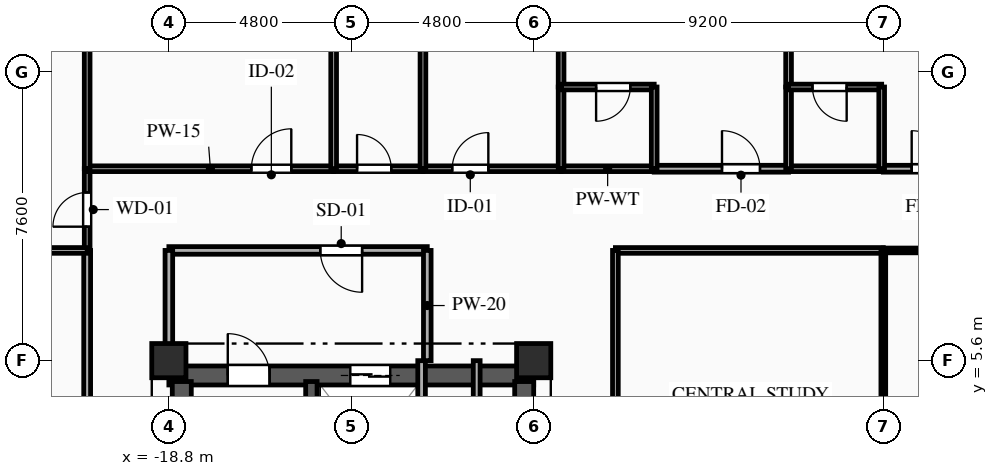
"""IFC4 building model, lengths in metres.
Left out: names, types, materials, properties, quantities, classifications, styles, units other than length and angle.
Written with IfcOpenShell. Run it as: python <this file> out.ifc"""

import sys

from ifc_helpers import new_model, si_unit, direction, frame, frame_2d, origin, origin_2d, place, context, subcontext, project, spatial, rectangle, extrude, element, fill, save


model = new_model("IFC4")
c1 = context("Model", 3, precision=1e-05, world=origin(), true_north=direction((0.0, 1.0)))
c2 = subcontext(c1, "Body", "Model", "MODEL_VIEW")
j1 = project(units=[si_unit("LENGTHUNIT", "METRE"), si_unit("PLANEANGLEUNIT", "RADIAN")], contexts=[c1])
p1 = place(None, origin())
s1 = spatial("IfcSite", under=j1, at=p1, CompositionType="ELEMENT")
p2 = place(p1, origin())
s2 = spatial("IfcBuilding", under=s1, at=p2, CompositionType="ELEMENT")
p3 = place(p2, frame((0.0, 0.0, 134.35)))
s3 = spatial("IfcBuildingStorey", under=s2, at=p3, CompositionType="ELEMENT", Elevation=134.35)
for number, where, z_axis, x_axis in (
    (1, (-18.8, 5.6, 0.0), (0.0, 0.0, 1.0), (1.0, 0.0, 0.0)),
    (2, (-9.2, 5.6, 0.0), (0.0, 0.0, 1.0), (1.0, 0.0, 0.0)),
):
    element("IfcColumn", number, at=place(p3, frame(where, z_axis=z_axis, x_axis=x_axis)), inside=s3, PredefinedType="COLUMN", context=c2, shape_type="SweptSolid", body=[
        extrude(rectangle(XDim=0.9, YDim=0.9, at=origin_2d()), origin(), (0.0, 0.0, 1.0), 3.35),
    ])
p4 = place(p3, frame((-18.8, 5.21, 0.0), z_axis=(0.0, 0.0, 1.0), x_axis=(1.0, 0.0, 0.0)))
e3 = element("IfcWall", 3, at=p4, inside=s3, PredefinedType="SHEAR", context=c2, shape_type="SweptSolid", body=[
    extrude(rectangle(XDim=9.6, YDim=0.5, at=frame_2d((4.8, 0.0))), origin(), (0.0, 0.0, 1.0), 3.04),
])
p5 = place(p4, frame((1.55, 0.0, 0.0)))
e4 = element("IfcOpeningElement", 4, at=p5, cuts=e3, PredefinedType="OPENING", context=c2, shape_type="SweptSolid", body=[
    extrude(rectangle(XDim=1.1, YDim=2.15, at=frame_2d((0.55, 1.075))), frame((0.0, 0.26, 0.0), z_axis=(0.0, -1.0, 0.0), x_axis=(1.0, 0.0, 0.0)), (0.0, 0.0, 1.0), 0.52),
])
p6 = place(p4, frame((4.775, 0.0, 0.0)))
e5 = element("IfcOpeningElement", 5, at=p6, cuts=e3, PredefinedType="OPENING", context=c2, shape_type="SweptSolid", body=[
    extrude(rectangle(XDim=1.05, YDim=2.1, at=frame_2d((0.525, 1.05))), frame((0.0, 0.26, 0.0), z_axis=(0.0, -1.0, 0.0), x_axis=(1.0, 0.0, 0.0)), (0.0, 0.0, 1.0), 0.52),
])
p7 = place(p3, frame((-18.46, -5.05, 0.0), z_axis=(0.0, 0.0, 1.0), x_axis=(0.0, 1.0, 0.0)))
e6 = element("IfcWall", 6, at=p7, inside=s3, PredefinedType="SHEAR", context=c2, shape_type="SweptSolid", body=[
    extrude(rectangle(XDim=10.1, YDim=0.5, at=frame_2d((5.05, 0.0))), origin(), (0.0, 0.0, 1.0), 3.04),
])
p8 = place(p3, frame((-9.45, -5.05, 0.0), z_axis=(0.0, 0.0, 1.0), x_axis=(0.0, 1.0, 0.0)))
e7 = element("IfcWall", 7, at=p8, inside=s3, PredefinedType="SHEAR", context=c2, shape_type="SweptSolid", body=[
    extrude(rectangle(XDim=10.1, YDim=0.5, at=frame_2d((5.05, 0.0))), origin(), (0.0, 0.0, 1.0), 3.04),
])
p9 = place(p8, frame((7.15, 0.0, 0.0)))
e8 = element("IfcOpeningElement", 8, at=p9, cuts=e7, PredefinedType="OPENING", context=c2, shape_type="SweptSolid", body=[
    extrude(rectangle(XDim=0.9, YDim=2.1, at=frame_2d((0.45, 1.05))), frame((0.0, 0.26, 0.0), z_axis=(0.0, -1.0, 0.0), x_axis=(1.0, 0.0, 0.0)), (0.0, 0.0, 1.0), 0.52),
])
p10 = place(p8, frame((2.4, 0.0, 0.0)))
e9 = element("IfcOpeningElement", 9, at=p10, cuts=e7, PredefinedType="OPENING", context=c2, shape_type="SweptSolid", body=[
    extrude(rectangle(XDim=1.2, YDim=2.15, at=frame_2d((0.6, 1.075))), frame((0.0, 0.26, 0.0), z_axis=(0.0, -1.0, 0.0), x_axis=(1.0, 0.0, 0.0)), (0.0, 0.0, 1.0), 0.52),
])
p11 = place(p8, frame((0.35, 0.0, 0.0)))
e10 = element("IfcOpeningElement", 10, at=p11, cuts=e7, PredefinedType="OPENING", context=c2, shape_type="SweptSolid", body=[
    extrude(rectangle(XDim=0.9, YDim=2.1, at=frame_2d((0.45, 1.05))), frame((0.0, 0.26, 0.0), z_axis=(0.0, -1.0, 0.0), x_axis=(1.0, 0.0, 0.0)), (0.0, 0.0, 1.0), 0.52),
])
p12 = place(p8, frame((5.0, 0.0, 0.0)))
e11 = element("IfcOpeningElement", 11, at=p12, cuts=e7, PredefinedType="OPENING", context=c2, shape_type="SweptSolid", body=[
    extrude(rectangle(XDim=0.9, YDim=2.1, at=frame_2d((0.45, 1.05))), frame((0.0, 0.26, 0.0), z_axis=(0.0, -1.0, 0.0), x_axis=(1.0, 0.0, 0.0)), (0.0, 0.0, 1.0), 0.52),
])
p13 = place(p3, frame((-15.05, -5.05, 0.0), z_axis=(0.0, 0.0, 1.0), x_axis=(0.0, 1.0, 0.0)))
e12 = element("IfcWall", 12, at=p13, inside=s3, PredefinedType="SHEAR", context=c2, shape_type="SweptSolid", body=[
    extrude(rectangle(XDim=10.1, YDim=0.3, at=frame_2d((5.05, 0.0))), origin(), (0.0, 0.0, 1.0), 3.04),
])
p14 = place(p3, frame((-12.15, 1.55, 0.0), z_axis=(0.0, 0.0, 1.0), x_axis=(0.0, 1.0, 0.0)))
e13 = element("IfcWall", 13, at=p14, inside=s3, PredefinedType="PARTITIONING", context=c2, shape_type="SweptSolid", body=[
    extrude(rectangle(XDim=4.05, YDim=0.2, at=frame_2d((2.025, 0.0))), origin(), (0.0, 0.0, 1.0), 3.04),
])
p15 = place(p3, frame((-12.0, 8.5, 0.0), z_axis=(0.0, 0.0, 1.0), x_axis=(-1.0, 0.0, 0.0)))
e14 = element("IfcWall", 14, at=p15, inside=s3, PredefinedType="PARTITIONING", context=c2, shape_type="SweptSolid", body=[
    extrude(rectangle(XDim=6.8, YDim=0.2, at=frame_2d((3.4, 0.0))), origin(), (0.0, 0.0, 1.0), 3.04),
])
p16 = place(p15, frame((1.715, 0.0, 0.0)))
e15 = element("IfcOpeningElement", 15, at=p16, cuts=e14, PredefinedType="OPENING", context=c2, shape_type="SweptSolid", body=[
    extrude(rectangle(XDim=1.1, YDim=2.15, at=frame_2d((0.55, 1.075))), frame((0.0, 0.11, 0.0), z_axis=(0.0, -1.0, 0.0), x_axis=(1.0, 0.0, 0.0)), (0.0, 0.0, 1.0), 0.22),
])
p17 = place(p3, frame((-18.8, 8.5, 0.0), z_axis=(0.0, 0.0, 1.0), x_axis=(0.0, -1.0, 0.0)))
e16 = element("IfcWall", 16, at=p17, inside=s3, PredefinedType="PARTITIONING", context=c2, shape_type="SweptSolid", body=[
    extrude(rectangle(XDim=2.9, YDim=0.2, at=frame_2d((1.45, 0.0))), origin(), (0.0, 0.0, 1.0), 2.525),
])
p18 = place(p3, frame((-12.0, 5.6, 0.0), z_axis=(0.0, 0.0, 1.0), x_axis=(0.0, 1.0, 0.0)))
e17 = element("IfcWall", 17, at=p18, inside=s3, PredefinedType="PARTITIONING", context=c2, shape_type="SweptSolid", body=[
    extrude(rectangle(XDim=2.9, YDim=0.2, at=frame_2d((1.45, 0.0))), origin(), (0.0, 0.0, 1.0), 3.04),
])
p19 = place(p3, frame((-10.7, 5.6, 0.0), z_axis=(0.0, 0.0, 1.0), x_axis=(0.0, -1.0, 0.0)))
e18 = element("IfcWall", 18, at=p19, inside=s3, PredefinedType="PARTITIONING", context=c2, shape_type="SweptSolid", body=[
    extrude(rectangle(XDim=4.05, YDim=0.18, at=frame_2d((2.025, 0.0))), origin(), (0.0, 0.0, 1.0), 3.04),
])
p20 = place(p19, frame((1.325, 0.0, 0.0)))
e19 = element("IfcOpeningElement", 19, at=p20, cuts=e18, PredefinedType="OPENING", context=c2, shape_type="SweptSolid", body=[
    extrude(rectangle(XDim=1.25, YDim=2.2, at=frame_2d((0.625, 1.1))), frame((0.0, 0.1, 0.0), z_axis=(0.0, -1.0, 0.0), x_axis=(1.0, 0.0, 0.0)), (0.0, 0.0, 1.0), 0.2),
])
p21 = place(p3, frame((-20.95, 8.5, 0.0), z_axis=(0.0, 0.0, 1.0), x_axis=(0.0, 1.0, 0.0)))
e20 = element("IfcWall", 20, at=p21, inside=s3, PredefinedType="PARTITIONING", context=c2, shape_type="SweptSolid", body=[
    extrude(rectangle(XDim=2.15, YDim=0.15, at=frame_2d((1.075, 0.0))), origin(), (0.0, 0.0, 1.0), 3.04),
])
p22 = place(p21, frame((0.625, 0.0, 0.0)))
e21 = element("IfcOpeningElement", 21, at=p22, cuts=e20, PredefinedType="OPENING", context=c2, shape_type="SweptSolid", body=[
    extrude(rectangle(XDim=0.9, YDim=2.1, at=frame_2d((0.45, 1.05))), frame((0.0, 0.085, 0.0), z_axis=(0.0, -1.0, 0.0), x_axis=(1.0, 0.0, 0.0)), (0.0, 0.0, 1.0), 0.17),
])
p23 = place(p3, frame((-20.95, 10.65, 0.0), z_axis=(0.0, 0.0, 1.0), x_axis=(1.0, 0.0, 0.0)))
e22 = element("IfcWall", 22, at=p23, inside=s3, PredefinedType="PARTITIONING", context=c2, shape_type="SweptSolid", body=[
    extrude(rectangle(XDim=6.486, YDim=0.15, at=frame_2d((3.243, 0.0))), origin(), (0.0, 0.0, 1.0), 3.04),
])
p24 = place(p23, frame((4.322, 0.0, 0.0)))
e23 = element("IfcOpeningElement", 23, at=p24, cuts=e22, PredefinedType="OPENING", context=c2, shape_type="SweptSolid", body=[
    extrude(rectangle(XDim=1.05, YDim=2.15, at=frame_2d((0.525, 1.075))), frame((0.0, 0.085, 0.0), z_axis=(0.0, -1.0, 0.0), x_axis=(1.0, 0.0, 0.0)), (0.0, 0.0, 1.0), 0.17),
])
p25 = place(p3, frame((-14.464, 10.65, 0.0), z_axis=(0.0, 0.0, 1.0), x_axis=(1.0, 0.0, 0.0)))
e24 = element("IfcWall", 24, at=p25, inside=s3, PredefinedType="PLUMBINGWALL", context=c2, shape_type="SweptSolid", body=[
    extrude(rectangle(XDim=2.35, YDim=0.15, at=frame_2d((1.175, 0.0))), origin(), (0.0, 0.0, 1.0), 3.04),
])
p26 = place(p25, frame((0.616, 0.0, 0.0)))
e25 = element("IfcOpeningElement", 25, at=p26, cuts=e24, PredefinedType="OPENING", context=c2, shape_type="SweptSolid", body=[
    extrude(rectangle(XDim=0.9, YDim=2.1, at=frame_2d((0.45, 1.05))), frame((0.0, 0.085, 0.0), z_axis=(0.0, -1.0, 0.0), x_axis=(1.0, 0.0, 0.0)), (0.0, 0.0, 1.0), 0.17),
])
p27 = place(p3, frame((-12.114, 10.65, 0.0), z_axis=(0.0, 0.0, 1.0), x_axis=(1.0, 0.0, 0.0)))
e26 = element("IfcWall", 26, at=p27, inside=s3, PredefinedType="PARTITIONING", context=c2, shape_type="SweptSolid", body=[
    extrude(rectangle(XDim=3.635, YDim=0.15, at=frame_2d((1.817, 0.0))), origin(), (0.0, 0.0, 1.0), 3.04),
])
p28 = place(p27, frame((0.771, 0.0, 0.0)))
e27 = element("IfcOpeningElement", 27, at=p28, cuts=e26, PredefinedType="OPENING", context=c2, shape_type="SweptSolid", body=[
    extrude(rectangle(XDim=0.95, YDim=2.1, at=frame_2d((0.475, 1.05))), frame((0.0, 0.085, 0.0), z_axis=(0.0, -1.0, 0.0), x_axis=(1.0, 0.0, 0.0)), (0.0, 0.0, 1.0), 0.17),
])
p29 = place(p3, frame((-6.029, 10.65, 0.0), z_axis=(0.0, 0.0, 1.0), x_axis=(1.0, 0.0, 0.0)))
e28 = element("IfcWall", 28, at=p29, inside=s3, PredefinedType="PARTITIONING", context=c2, shape_type="SweptSolid", body=[
    extrude(rectangle(XDim=3.536, YDim=0.18, at=frame_2d((1.768, 0.0))), origin(), (0.0, 0.0, 1.0), 3.04),
])
p30 = place(p29, frame((1.784, 0.0, 0.0)))
e29 = element("IfcOpeningElement", 29, at=p30, cuts=e28, PredefinedType="OPENING", context=c2, shape_type="SweptSolid", body=[
    extrude(rectangle(XDim=1.0, YDim=2.15, at=frame_2d((0.5, 1.075))), frame((0.0, 0.1, 0.0), z_axis=(0.0, -1.0, 0.0), x_axis=(1.0, 0.0, 0.0)), (0.0, 0.0, 1.0), 0.2),
])
for number, where, z_axis, x_axis in (
    (30, (-8.479, 10.65, 0.0), (0.0, 0.0, 1.0), (1.0, 0.0, 0.0)),
    (31, (-2.493, 10.65, 0.0), (0.0, 0.0, 1.0), (1.0, 0.0, 0.0)),
):
    element("IfcWall", number, at=place(p3, frame(where, z_axis=z_axis, x_axis=x_axis)), inside=s3, PredefinedType="PLUMBINGWALL", context=c2, shape_type="SweptSolid", body=[
        extrude(rectangle(XDim=2.45, YDim=0.15, at=frame_2d((1.225, 0.0))), origin(), (0.0, 0.0, 1.0), 3.04),
    ])
p31 = place(p3, frame((0.0, 8.5, 0.0), z_axis=(0.0, 0.0, 1.0), x_axis=(-1.0, 0.0, 0.0)))
e32 = element("IfcWall", 32, at=p31, inside=s3, PredefinedType="PARTITIONING", context=c2, shape_type="SweptSolid", body=[
    extrude(rectangle(XDim=7.05, YDim=0.15, at=frame_2d((3.525, 0.0))), origin(), (0.0, 0.0, 1.0), 3.04),
])
p32 = place(p3, frame((0.0, 10.65, 0.0), z_axis=(0.0, 0.0, 1.0), x_axis=(1.0, 0.0, 0.0)))
e33 = element("IfcWall", 33, at=p32, inside=s3, PredefinedType="PARTITIONING", context=c2, shape_type="SweptSolid", body=[
    extrude(rectangle(XDim=3.493, YDim=0.18, at=frame_2d((1.747, 0.0))), origin(), (0.0, 0.0, 1.0), 3.04),
])
p33 = place(p32, frame((0.747, 0.0, 0.0)))
e34 = element("IfcOpeningElement", 34, at=p33, cuts=e33, PredefinedType="OPENING", context=c2, shape_type="SweptSolid", body=[
    extrude(rectangle(XDim=1.0, YDim=2.15, at=frame_2d((0.5, 1.075))), frame((0.0, 0.1, 0.0), z_axis=(0.0, -1.0, 0.0), x_axis=(1.0, 0.0, 0.0)), (0.0, 0.0, 1.0), 0.2),
])
p34 = place(p3, frame((7.05, 8.5, 0.0), z_axis=(0.0, 0.0, 1.0), x_axis=(-1.0, 0.0, 0.0)))
e35 = element("IfcWall", 35, at=p34, inside=s3, PredefinedType="PARTITIONING", context=c2, shape_type="SweptSolid", body=[
    extrude(rectangle(XDim=7.05, YDim=0.125, at=frame_2d((3.525, 0.0))), origin(), (0.0, 0.0, 1.0), 3.04),
])
p35 = place(p3, frame((-20.95, -5.6, 0.0), z_axis=(0.0, 0.0, 1.0), x_axis=(0.0, 1.0, 0.0)))
e36 = element("IfcWall", 36, at=p35, inside=s3, PredefinedType="PARTITIONING", context=c2, shape_type="SweptSolid", body=[
    extrude(rectangle(XDim=14.1, YDim=0.18, at=frame_2d((7.05, 0.0))), origin(), (0.0, 0.0, 1.0), 3.04),
])
p36 = place(p35, frame((5.058, 0.0, 0.0)))
e37 = element("IfcOpeningElement", 37, at=p36, cuts=e36, PredefinedType="OPENING", context=c2, shape_type="SweptSolid", body=[
    extrude(rectangle(XDim=1.0, YDim=2.15, at=frame_2d((0.5, 1.075))), frame((0.0, 0.1, 0.0), z_axis=(0.0, -1.0, 0.0), x_axis=(1.0, 0.0, 0.0)), (0.0, 0.0, 1.0), 0.2),
])
p37 = place(p3, frame((-7.05, 8.5, 0.0), z_axis=(0.0, 0.0, 1.0), x_axis=(0.0, -1.0, 0.0)))
e38 = element("IfcWall", 38, at=p37, inside=s3, PredefinedType="PARTITIONING", context=c2, shape_type="SweptSolid", body=[
    extrude(rectangle(XDim=9.3, YDim=0.15, at=frame_2d((4.65, 0.0))), origin(), (0.0, 0.0, 1.0), 3.04),
])
p38 = place(p37, frame((6.784, 0.0, 0.0)))
e39 = element("IfcOpeningElement", 39, at=p38, cuts=e38, PredefinedType="OPENING", context=c2, shape_type="SweptSolid", body=[
    extrude(rectangle(XDim=1.05, YDim=2.15, at=frame_2d((0.525, 1.075))), frame((0.0, 0.085, 0.0), z_axis=(0.0, -1.0, 0.0), x_axis=(1.0, 0.0, 0.0)), (0.0, 0.0, 1.0), 0.17),
])
p39 = place(p3, frame((-23.6, 8.5, 0.0), z_axis=(0.0, 0.0, 1.0), x_axis=(1.0, 0.0, 0.0)))
e40 = element("IfcWall", 40, at=p39, inside=s3, PredefinedType="PARTITIONING", context=c2, shape_type="SweptSolid", body=[
    extrude(rectangle(XDim=2.65, YDim=0.15, at=frame_2d((1.325, 0.0))), origin(), (0.0, 0.0, 1.0), 3.04),
])
p40 = place(p39, frame((0.635, 0.0, 0.0)))
e41 = element("IfcOpeningElement", 41, at=p40, cuts=e40, PredefinedType="OPENING", context=c2, shape_type="SweptSolid", body=[
    extrude(rectangle(XDim=1.05, YDim=2.15, at=frame_2d((0.525, 1.075))), frame((0.0, 0.085, 0.0), z_axis=(0.0, -1.0, 0.0), x_axis=(1.0, 0.0, 0.0)), (0.0, 0.0, 1.0), 0.17),
])
p41 = place(p3, frame((-20.95, 20.4, 0.0), z_axis=(0.0, 0.0, 1.0), x_axis=(0.0, -1.0, 0.0)))
e42 = element("IfcWall", 42, at=p41, inside=s3, PredefinedType="PARTITIONING", context=c2, shape_type="SweptSolid", body=[
    extrude(rectangle(XDim=9.75, YDim=0.15, at=frame_2d((4.875, 0.0))), origin(), (0.0, 0.0, 1.0), 3.04),
])
for number, where, z_axis, x_axis in (
    (43, (-14.464, 20.4, 0.0), (0.0, 0.0, 1.0), (0.0, -1.0, 0.0)),
    (44, (-12.114, 20.4, 0.0), (0.0, 0.0, 1.0), (0.0, -1.0, 0.0)),
):
    element("IfcWall", number, at=place(p3, frame(where, z_axis=z_axis, x_axis=x_axis)), inside=s3, PredefinedType="PLUMBINGWALL", context=c2, shape_type="SweptSolid", body=[
        extrude(rectangle(XDim=9.75, YDim=0.15, at=frame_2d((4.875, 0.0))), origin(), (0.0, 0.0, 1.0), 3.04),
    ])
p42 = place(p3, frame((-8.479, 20.4, 0.0), z_axis=(0.0, 0.0, 1.0), x_axis=(0.0, -1.0, 0.0)))
e45 = element("IfcWall", 45, at=p42, inside=s3, PredefinedType="PARTITIONING", context=c2, shape_type="SweptSolid", body=[
    extrude(rectangle(XDim=7.6, YDim=0.15, at=frame_2d((3.8, 0.0))), origin(), (0.0, 0.0, 1.0), 3.04),
])
p43 = place(p3, frame((-8.479, 12.8, 0.0), z_axis=(0.0, 0.0, 1.0), x_axis=(0.0, -1.0, 0.0)))
e46 = element("IfcWall", 46, at=p43, inside=s3, PredefinedType="PLUMBINGWALL", context=c2, shape_type="SweptSolid", body=[
    extrude(rectangle(XDim=2.15, YDim=0.15, at=frame_2d((1.075, 0.0))), origin(), (0.0, 0.0, 1.0), 3.04),
])
p44 = place(p3, frame((-6.029, 12.8, 0.0), z_axis=(0.0, 0.0, 1.0), x_axis=(-1.0, 0.0, 0.0)))
e47 = element("IfcWall", 47, at=p44, inside=s3, PredefinedType="PLUMBINGWALL", context=c2, shape_type="SweptSolid", body=[
    extrude(rectangle(XDim=2.45, YDim=0.15, at=frame_2d((1.225, 0.0))), origin(), (0.0, 0.0, 1.0), 3.04),
])
p45 = place(p44, frame((0.629, 0.0, 0.0)))
e48 = element("IfcOpeningElement", 48, at=p45, cuts=e47, PredefinedType="OPENING", context=c2, shape_type="SweptSolid", body=[
    extrude(rectangle(XDim=0.9, YDim=2.1, at=frame_2d((0.45, 1.05))), frame((0.0, 0.085, 0.0), z_axis=(0.0, -1.0, 0.0), x_axis=(1.0, 0.0, 0.0)), (0.0, 0.0, 1.0), 0.17),
])
p46 = place(p3, frame((-6.029, 10.65, 0.0), z_axis=(0.0, 0.0, 1.0), x_axis=(0.0, 1.0, 0.0)))
e49 = element("IfcWall", 49, at=p46, inside=s3, PredefinedType="PLUMBINGWALL", context=c2, shape_type="SweptSolid", body=[
    extrude(rectangle(XDim=2.15, YDim=0.15, at=frame_2d((1.075, 0.0))), origin(), (0.0, 0.0, 1.0), 3.04),
])
p47 = place(p3, frame((-2.493, 20.4, 0.0), z_axis=(0.0, 0.0, 1.0), x_axis=(0.0, -1.0, 0.0)))
e50 = element("IfcWall", 50, at=p47, inside=s3, PredefinedType="PARTITIONING", context=c2, shape_type="SweptSolid", body=[
    extrude(rectangle(XDim=7.6, YDim=0.15, at=frame_2d((3.8, 0.0))), origin(), (0.0, 0.0, 1.0), 3.04),
])
p48 = place(p3, frame((-2.493, 12.8, 0.0), z_axis=(0.0, 0.0, 1.0), x_axis=(0.0, -1.0, 0.0)))
e51 = element("IfcWall", 51, at=p48, inside=s3, PredefinedType="PLUMBINGWALL", context=c2, shape_type="SweptSolid", body=[
    extrude(rectangle(XDim=2.15, YDim=0.15, at=frame_2d((1.075, 0.0))), origin(), (0.0, 0.0, 1.0), 3.04),
])
p49 = place(p3, frame((-0.043, 12.8, 0.0), z_axis=(0.0, 0.0, 1.0), x_axis=(-1.0, 0.0, 0.0)))
e52 = element("IfcWall", 52, at=p49, inside=s3, PredefinedType="PLUMBINGWALL", context=c2, shape_type="SweptSolid", body=[
    extrude(rectangle(XDim=2.45, YDim=0.15, at=frame_2d((1.225, 0.0))), origin(), (0.0, 0.0, 1.0), 3.04),
])
p50 = place(p49, frame((0.921, 0.0, 0.0)))
e53 = element("IfcOpeningElement", 53, at=p50, cuts=e52, PredefinedType="OPENING", context=c2, shape_type="SweptSolid", body=[
    extrude(rectangle(XDim=0.9, YDim=2.1, at=frame_2d((0.45, 1.05))), frame((0.0, 0.085, 0.0), z_axis=(0.0, -1.0, 0.0), x_axis=(1.0, 0.0, 0.0)), (0.0, 0.0, 1.0), 0.17),
])
p51 = place(p3, frame((-0.043, 10.65, 0.0), z_axis=(0.0, 0.0, 1.0), x_axis=(0.0, 1.0, 0.0)))
e54 = element("IfcWall", 54, at=p51, inside=s3, PredefinedType="PLUMBINGWALL", context=c2, shape_type="SweptSolid", body=[
    extrude(rectangle(XDim=2.15, YDim=0.15, at=frame_2d((1.075, 0.0))), origin(), (0.0, 0.0, 1.0), 3.04),
])
p52 = place(p3, frame((0.0, 8.5, 0.0), z_axis=(0.0, 0.0, 1.0), x_axis=(0.0, -1.0, 0.0)))
e55 = element("IfcWall", 55, at=p52, inside=s3, PredefinedType="PARTITIONING", context=c2, shape_type="SweptSolid", body=[
    extrude(rectangle(XDim=9.3, YDim=0.125, at=frame_2d((4.65, 0.0))), origin(), (0.0, 0.0, 1.0), 3.04),
])
p53 = place(p5, origin())
e56 = element("IfcDoor", 56, at=p53, inside=s3, OperationType="SINGLE_SWING_LEFT", PredefinedType="DOOR", context=c2, shape_type="SweptSolid", body=[
    extrude(rectangle(XDim=1.1, YDim=2.15, at=frame_2d((0.55, 1.075))), frame((0.0, 0.025, 0.0), z_axis=(0.0, -1.0, 0.0), x_axis=(1.0, 0.0, 0.0)), (0.0, 0.0, 1.0), 0.05),
])
fill(e4, e56)
p54 = place(p6, origin())
e57 = element("IfcDoor", 57, at=p54, inside=s3, OperationType="DOUBLE_DOOR_SLIDING", PredefinedType="DOOR", context=c2, shape_type="SweptSolid", body=[
    extrude(rectangle(XDim=1.05, YDim=2.1, at=frame_2d((0.525, 1.05))), frame((0.0, 0.025, 0.0), z_axis=(0.0, -1.0, 0.0), x_axis=(1.0, 0.0, 0.0)), (0.0, 0.0, 1.0), 0.05),
])
fill(e5, e57)
p55 = place(p16, origin())
e58 = element("IfcDoor", 58, at=p55, inside=s3, OperationType="SINGLE_SWING_LEFT", PredefinedType="DOOR", context=c2, shape_type="SweptSolid", body=[
    extrude(rectangle(XDim=1.1, YDim=2.15, at=frame_2d((0.55, 1.075))), frame((0.0, 0.025, 0.0), z_axis=(0.0, -1.0, 0.0), x_axis=(1.0, 0.0, 0.0)), (0.0, 0.0, 1.0), 0.05),
])
fill(e15, e58)
p56 = place(p22, origin())
e59 = element("IfcDoor", 59, at=p56, inside=s3, OperationType="SINGLE_SWING_LEFT", PredefinedType="DOOR", context=c2, shape_type="SweptSolid", body=[
    extrude(rectangle(XDim=0.9, YDim=2.1, at=frame_2d((0.45, 1.05))), frame((0.0, 0.025, 0.0), z_axis=(0.0, -1.0, 0.0), x_axis=(1.0, 0.0, 0.0)), (0.0, 0.0, 1.0), 0.05),
])
fill(e21, e59)
p57 = place(p24, origin())
e60 = element("IfcDoor", 60, at=p57, inside=s3, OperationType="SINGLE_SWING_RIGHT", PredefinedType="DOOR", context=c2, shape_type="SweptSolid", body=[
    extrude(rectangle(XDim=1.05, YDim=2.15, at=frame_2d((0.525, 1.075))), frame((0.0, 0.025, 0.0), z_axis=(0.0, -1.0, 0.0), x_axis=(1.0, 0.0, 0.0)), (0.0, 0.0, 1.0), 0.05),
])
fill(e23, e60)
p58 = place(p26, origin())
e61 = element("IfcDoor", 61, at=p58, inside=s3, OperationType="SINGLE_SWING_LEFT", PredefinedType="DOOR", context=c2, shape_type="SweptSolid", body=[
    extrude(rectangle(XDim=0.9, YDim=2.1, at=frame_2d((0.45, 1.05))), frame((0.0, 0.025, 0.0), z_axis=(0.0, -1.0, 0.0), x_axis=(1.0, 0.0, 0.0)), (0.0, 0.0, 1.0), 0.05),
])
fill(e25, e61)
p59 = place(p28, origin())
e62 = element("IfcDoor", 62, at=p59, inside=s3, OperationType="SINGLE_SWING_RIGHT", PredefinedType="DOOR", context=c2, shape_type="SweptSolid", body=[
    extrude(rectangle(XDim=0.95, YDim=2.1, at=frame_2d((0.475, 1.05))), frame((0.0, 0.025, 0.0), z_axis=(0.0, -1.0, 0.0), x_axis=(1.0, 0.0, 0.0)), (0.0, 0.0, 1.0), 0.05),
])
fill(e27, e62)
p60 = place(p30, origin())
e63 = element("IfcDoor", 63, at=p60, inside=s3, OperationType="SINGLE_SWING_LEFT", PredefinedType="DOOR", context=c2, shape_type="SweptSolid", body=[
    extrude(rectangle(XDim=1.0, YDim=2.15, at=frame_2d((0.5, 1.075))), frame((0.0, 0.025, 0.0), z_axis=(0.0, -1.0, 0.0), x_axis=(1.0, 0.0, 0.0)), (0.0, 0.0, 1.0), 0.05),
])
fill(e29, e63)
p61 = place(p33, origin())
e64 = element("IfcDoor", 64, at=p61, inside=s3, OperationType="SINGLE_SWING_LEFT", PredefinedType="DOOR", context=c2, shape_type="SweptSolid", body=[
    extrude(rectangle(XDim=1.0, YDim=2.15, at=frame_2d((0.5, 1.075))), frame((0.0, 0.025, 0.0), z_axis=(0.0, -1.0, 0.0), x_axis=(1.0, 0.0, 0.0)), (0.0, 0.0, 1.0), 0.05),
])
fill(e34, e64)
p62 = place(p45, origin())
e65 = element("IfcDoor", 65, at=p62, inside=s3, OperationType="SINGLE_SWING_RIGHT", PredefinedType="DOOR", context=c2, shape_type="SweptSolid", body=[
    extrude(rectangle(XDim=0.9, YDim=2.1, at=frame_2d((0.45, 1.05))), frame((0.0, 0.025, 0.0), z_axis=(0.0, -1.0, 0.0), x_axis=(1.0, 0.0, 0.0)), (0.0, 0.0, 1.0), 0.05),
])
fill(e48, e65)
p63 = place(p50, origin())
e66 = element("IfcDoor", 66, at=p63, inside=s3, OperationType="SINGLE_SWING_LEFT", PredefinedType="DOOR", context=c2, shape_type="SweptSolid", body=[
    extrude(rectangle(XDim=0.9, YDim=2.1, at=frame_2d((0.45, 1.05))), frame((0.0, 0.025, 0.0), z_axis=(0.0, -1.0, 0.0), x_axis=(1.0, 0.0, 0.0)), (0.0, 0.0, 1.0), 0.05),
])
fill(e53, e66)
save(model, sys.argv[1])
